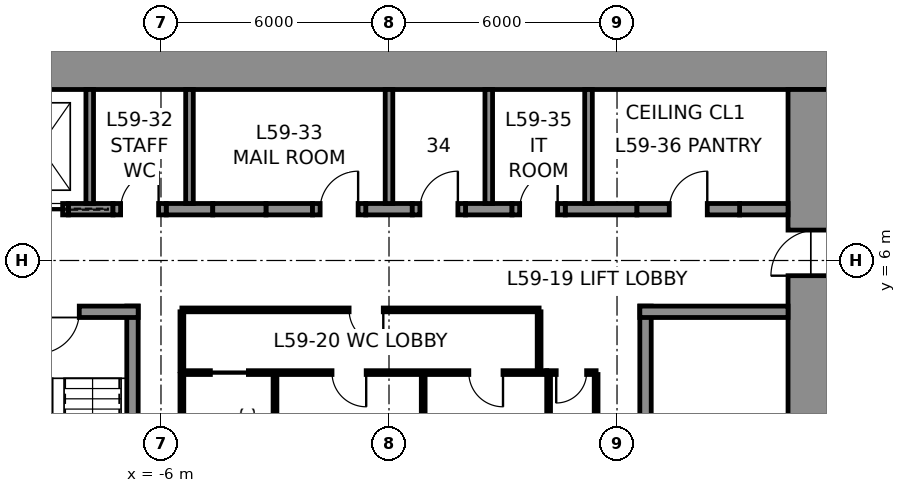
"""IFC4 building model, lengths in metres.
Left out: names, types, materials, properties, quantities, classifications, styles, units other than length and angle.
Written with IfcOpenShell. Run it as: python <this file> out.ifc"""

import sys

from ifc_helpers import new_model, si_unit, direction, frame, frame_2d, origin, place, context, subcontext, project, spatial, rectangle, extrude, element, fill, save


model = new_model("IFC4")
c1 = context("Model", 3, precision=1e-05, world=origin(), true_north=direction((0.0, 1.0)))
c2 = subcontext(c1, "Body", "Model", "MODEL_VIEW")
j1 = project(units=[si_unit("LENGTHUNIT", "METRE"), si_unit("PLANEANGLEUNIT", "RADIAN")], contexts=[c1])
p1 = place(None, origin())
s1 = spatial("IfcSite", under=j1, at=p1, CompositionType="ELEMENT")
p2 = place(p1, origin())
s2 = spatial("IfcBuilding", under=s1, at=p2, CompositionType="ELEMENT")
p3 = place(p2, frame((0.0, 0.0, 265.8)))
s3 = spatial("IfcBuildingStorey", under=s2, at=p3, CompositionType="ELEMENT", Elevation=265.8)
p4 = place(p3, frame((-12.0, 11.25, 0.0), z_axis=(0.0, 0.0, 1.0), x_axis=(1.0, 0.0, 0.0)))
e1 = element("IfcWall", 1, at=p4, inside=s3, PredefinedType="SHEAR", context=c2, shape_type="SweptSolid", body=[
    extrude(rectangle(XDim=24.0, YDim=1.5, at=frame_2d((12.0, 0.0))), origin(), (0.0, 0.0, 1.0), 4.0),
])
p5 = place(p3, frame((11.25, 10.5, 0.0), z_axis=(0.0, 0.0, 1.0), x_axis=(0.0, -1.0, 0.0)))
e2 = element("IfcWall", 2, at=p5, inside=s3, PredefinedType="SHEAR", context=c2, shape_type="SweptSolid", body=[
    extrude(rectangle(XDim=21.0, YDim=1.5, at=frame_2d((10.5, 0.0))), origin(), (0.0, 0.0, 1.0), 4.0),
])
p6 = place(p5, frame((3.7, 0.0, 0.0)))
e3 = element("IfcOpeningElement", 3, at=p6, cuts=e2, PredefinedType="OPENING", context=c2, shape_type="SweptSolid", body=[
    extrude(rectangle(XDim=1.2, YDim=2.3, at=frame_2d((0.6, 1.15))), frame((0.0, 0.76, 0.0), z_axis=(0.0, -1.0, 0.0), x_axis=(1.0, 0.0, 0.0)), (0.0, 0.0, 1.0), 1.52),
])
p7 = place(p5, frame((16.1, 0.0, 0.0)))
e4 = element("IfcOpeningElement", 4, at=p7, cuts=e2, PredefinedType="OPENING", context=c2, shape_type="SweptSolid", body=[
    extrude(rectangle(XDim=1.2, YDim=2.3, at=frame_2d((0.6, 1.15))), frame((0.0, 0.76, 0.0), z_axis=(0.0, -1.0, 0.0), x_axis=(1.0, 0.0, 0.0)), (0.0, 0.0, 1.0), 1.52),
])
p8 = place(p3, frame((-8.438, 7.35, 0.0), z_axis=(0.0, 0.0, 1.0), x_axis=(1.0, 0.0, 0.0)))
e5 = element("IfcWall", 5, at=p8, inside=s3, PredefinedType="SHEAR", context=c2, shape_type="SweptSolid", body=[
    extrude(rectangle(XDim=1.175, YDim=0.3, at=frame_2d((0.587, 0.0))), origin(), (0.0, 0.0, 1.0), 4.0),
])
for number, where, z_axis, x_axis in (
    (6, (-5.863, 7.35, 0.0), (0.0, 0.0, 1.0), (1.0, 0.0, 0.0)),
    (7, (-3.238, 7.35, 0.0), (0.0, 0.0, 1.0), (1.0, 0.0, 0.0)),
    (8, (-0.613, 7.35, 0.0), (0.0, 0.0, 1.0), (1.0, 0.0, 0.0)),
    (9, (2.012, 7.35, 0.0), (0.0, 0.0, 1.0), (1.0, 0.0, 0.0)),
):
    element("IfcWall", number, at=place(p3, frame(where, z_axis=z_axis, x_axis=x_axis)), inside=s3, PredefinedType="SHEAR", context=c2, shape_type="SweptSolid", body=[
        extrude(rectangle(XDim=1.225, YDim=0.3, at=frame_2d((0.613, 0.0))), origin(), (0.0, 0.0, 1.0), 4.0),
    ])
p9 = place(p3, frame((4.637, 7.35, 0.0), z_axis=(0.0, 0.0, 1.0), x_axis=(1.0, 0.0, 0.0)))
e10 = element("IfcWall", 10, at=p9, inside=s3, PredefinedType="SHEAR", context=c2, shape_type="SweptSolid", body=[
    extrude(rectangle(XDim=1.887, YDim=0.3, at=frame_2d((0.944, 0.0))), origin(), (0.0, 0.0, 1.0), 4.0),
])
p10 = place(p3, frame((9.225, 7.35, 0.0), z_axis=(0.0, 0.0, 1.0), x_axis=(1.0, 0.0, 0.0)))
e11 = element("IfcWall", 11, at=p10, inside=s3, PredefinedType="SHEAR", context=c2, shape_type="SweptSolid", body=[
    extrude(rectangle(XDim=1.275, YDim=0.3, at=frame_2d((0.637, 0.0))), origin(), (0.0, 0.0, 1.0), 4.0),
])
p11 = place(p3, frame((-9.938, 7.35, 0.0), z_axis=(0.0, 0.0, 1.0), x_axis=(1.0, 0.0, 0.0)))
e12 = element("IfcWall", 12, at=p11, inside=s3, PredefinedType="PARTITIONING", context=c2, shape_type="SweptSolid", body=[
    extrude(rectangle(XDim=1.5, YDim=0.3, at=frame_2d((0.75, 0.0))), origin(), (0.0, 0.0, 1.0), 4.0),
])
p12 = place(p11, frame((0.15, 0.0, 0.0)))
e13 = element("IfcOpeningElement", 13, at=p12, cuts=e12, PredefinedType="OPENING", context=c2, shape_type="SweptSolid", body=[
    extrude(rectangle(XDim=1.2, YDim=2.3, at=frame_2d((0.6, 1.15))), frame((0.0, 0.16, 0.0), z_axis=(0.0, -1.0, 0.0), x_axis=(1.0, 0.0, 0.0)), (0.0, 0.0, 1.0), 0.32),
])
p13 = place(p3, frame((-7.262, 7.35, 0.0), z_axis=(0.0, 0.0, 1.0), x_axis=(1.0, 0.0, 0.0)))
e14 = element("IfcWall", 14, at=p13, inside=s3, PredefinedType="PARTITIONING", context=c2, shape_type="SweptSolid", body=[
    extrude(rectangle(XDim=1.4, YDim=0.3, at=frame_2d((0.7, 0.0))), origin(), (0.0, 0.0, 1.0), 4.0),
])
p14 = place(p13, frame((0.2, 0.0, 0.0)))
e15 = element("IfcOpeningElement", 15, at=p14, cuts=e14, PredefinedType="OPENING", context=c2, shape_type="SweptSolid", body=[
    extrude(rectangle(XDim=1.0, YDim=2.3, at=frame_2d((0.5, 1.15))), frame((0.0, 0.16, 0.0), z_axis=(0.0, -1.0, 0.0), x_axis=(1.0, 0.0, 0.0)), (0.0, 0.0, 1.0), 0.32),
])
p15 = place(p3, frame((-4.637, 7.35, 0.0), z_axis=(0.0, 0.0, 1.0), x_axis=(1.0, 0.0, 0.0)))
e16 = element("IfcWall", 16, at=p15, inside=s3, PredefinedType="PARTITIONING", context=c2, shape_type="SweptSolid", body=[
    extrude(rectangle(XDim=1.4, YDim=0.3, at=frame_2d((0.7, 0.0))), origin(), (0.0, 0.0, 1.0), 4.0),
])
p16 = place(p3, frame((-2.012, 7.35, 0.0), z_axis=(0.0, 0.0, 1.0), x_axis=(1.0, 0.0, 0.0)))
e17 = element("IfcWall", 17, at=p16, inside=s3, PredefinedType="PARTITIONING", context=c2, shape_type="SweptSolid", body=[
    extrude(rectangle(XDim=1.4, YDim=0.3, at=frame_2d((0.7, 0.0))), origin(), (0.0, 0.0, 1.0), 4.0),
])
p17 = place(p16, frame((0.2, 0.0, 0.0)))
e18 = element("IfcOpeningElement", 18, at=p17, cuts=e17, PredefinedType="OPENING", context=c2, shape_type="SweptSolid", body=[
    extrude(rectangle(XDim=1.0, YDim=2.3, at=frame_2d((0.5, 1.15))), frame((0.0, 0.16, 0.0), z_axis=(0.0, -1.0, 0.0), x_axis=(1.0, 0.0, 0.0)), (0.0, 0.0, 1.0), 0.32),
])
p18 = place(p3, frame((0.613, 7.35, 0.0), z_axis=(0.0, 0.0, 1.0), x_axis=(1.0, 0.0, 0.0)))
e19 = element("IfcWall", 19, at=p18, inside=s3, PredefinedType="PARTITIONING", context=c2, shape_type="SweptSolid", body=[
    extrude(rectangle(XDim=1.4, YDim=0.3, at=frame_2d((0.7, 0.0))), origin(), (0.0, 0.0, 1.0), 4.0),
])
p19 = place(p18, frame((0.2, 0.0, 0.0)))
e20 = element("IfcOpeningElement", 20, at=p19, cuts=e19, PredefinedType="OPENING", context=c2, shape_type="SweptSolid", body=[
    extrude(rectangle(XDim=1.0, YDim=2.3, at=frame_2d((0.5, 1.15))), frame((0.0, 0.16, 0.0), z_axis=(0.0, -1.0, 0.0), x_axis=(1.0, 0.0, 0.0)), (0.0, 0.0, 1.0), 0.32),
])
p20 = place(p3, frame((3.238, 7.35, 0.0), z_axis=(0.0, 0.0, 1.0), x_axis=(1.0, 0.0, 0.0)))
e21 = element("IfcWall", 21, at=p20, inside=s3, PredefinedType="PARTITIONING", context=c2, shape_type="SweptSolid", body=[
    extrude(rectangle(XDim=1.4, YDim=0.3, at=frame_2d((0.7, 0.0))), origin(), (0.0, 0.0, 1.0), 4.0),
])
p21 = place(p20, frame((0.2, 0.0, 0.0)))
e22 = element("IfcOpeningElement", 22, at=p21, cuts=e21, PredefinedType="OPENING", context=c2, shape_type="SweptSolid", body=[
    extrude(rectangle(XDim=1.0, YDim=2.3, at=frame_2d((0.5, 1.15))), frame((0.0, 0.16, 0.0), z_axis=(0.0, -1.0, 0.0), x_axis=(1.0, 0.0, 0.0)), (0.0, 0.0, 1.0), 0.32),
])
p22 = place(p3, frame((6.525, 7.35, 0.0), z_axis=(0.0, 0.0, 1.0), x_axis=(1.0, 0.0, 0.0)))
e23 = element("IfcWall", 23, at=p22, inside=s3, PredefinedType="PARTITIONING", context=c2, shape_type="SweptSolid", body=[
    extrude(rectangle(XDim=2.7, YDim=0.3, at=frame_2d((1.35, 0.0))), origin(), (0.0, 0.0, 1.0), 4.0),
])
p23 = place(p22, frame((0.85, 0.0, 0.0)))
e24 = element("IfcOpeningElement", 24, at=p23, cuts=e23, PredefinedType="OPENING", context=c2, shape_type="SweptSolid", body=[
    extrude(rectangle(XDim=1.0, YDim=2.3, at=frame_2d((0.5, 1.15))), frame((0.0, 0.16, 0.0), z_axis=(0.0, -1.0, 0.0), x_axis=(1.0, 0.0, 0.0)), (0.0, 0.0, 1.0), 0.32),
])
for number, where, z_axis, x_axis in (
    (25, (-7.875, 7.5, 0.0), (0.0, 0.0, 1.0), (0.0, 1.0, 0.0)),
    (26, (-5.25, 7.5, 0.0), (0.0, 0.0, 1.0), (0.0, 1.0, 0.0)),
    (27, (0.0, 7.5, 0.0), (0.0, 0.0, 1.0), (0.0, 1.0, 0.0)),
    (28, (2.625, 7.5, 0.0), (0.0, 0.0, 1.0), (0.0, 1.0, 0.0)),
    (29, (5.25, 7.5, 0.0), (0.0, 0.0, 1.0), (0.0, 1.0, 0.0)),
):
    element("IfcWall", number, at=place(p3, frame(where, z_axis=z_axis, x_axis=x_axis)), inside=s3, PredefinedType="PARTITIONING", context=c2, shape_type="SweptSolid", body=[
        extrude(rectangle(XDim=3.0, YDim=0.2, at=frame_2d((1.5, 0.0))), origin(), (0.0, 0.0, 1.0), 4.0),
    ])
p24 = place(p3, frame((-6.75, -4.8, 0.0), z_axis=(0.0, 0.0, 1.0), x_axis=(0.0, 1.0, 0.0)))
e30 = element("IfcWall", 30, at=p24, inside=s3, PredefinedType="SOLIDWALL", context=c2, shape_type="SweptSolid", body=[
    extrude(rectangle(XDim=9.6, YDim=0.3, at=frame_2d((4.8, 0.0))), origin(), (0.0, 0.0, 1.0), 3.75),
])
p25 = place(p3, frame((-10.5, 4.65, 0.0), z_axis=(0.0, 0.0, 1.0), x_axis=(1.0, 0.0, 0.0)))
e31 = element("IfcWall", 31, at=p25, inside=s3, PredefinedType="SOLIDWALL", context=c2, shape_type="SweptSolid", body=[
    extrude(rectangle(XDim=3.9, YDim=0.3, at=frame_2d((1.95, 0.0))), origin(), (0.0, 0.0, 1.0), 3.75),
])
p26 = place(p25, frame((1.25, 0.0, 0.0)))
e32 = element("IfcOpeningElement", 32, at=p26, cuts=e31, PredefinedType="OPENING", context=c2, shape_type="SweptSolid", body=[
    extrude(rectangle(XDim=1.1, YDim=2.3, at=frame_2d((0.55, 1.15))), frame((0.0, 0.16, 0.0), z_axis=(0.0, -1.0, 0.0), x_axis=(1.0, 0.0, 0.0)), (0.0, 0.0, 1.0), 0.32),
])
p27 = place(p3, frame((6.75, -4.8, 0.0), z_axis=(0.0, 0.0, 1.0), x_axis=(0.0, 1.0, 0.0)))
e33 = element("IfcWall", 33, at=p27, inside=s3, PredefinedType="SOLIDWALL", context=c2, shape_type="SweptSolid", body=[
    extrude(rectangle(XDim=9.6, YDim=0.3, at=frame_2d((4.8, 0.0))), origin(), (0.0, 0.0, 1.0), 3.75),
])
p28 = place(p3, frame((6.6, 4.65, 0.0), z_axis=(0.0, 0.0, 1.0), x_axis=(1.0, 0.0, 0.0)))
e34 = element("IfcWall", 34, at=p28, inside=s3, PredefinedType="SOLIDWALL", context=c2, shape_type="SweptSolid", body=[
    extrude(rectangle(XDim=3.9, YDim=0.3, at=frame_2d((1.95, 0.0))), origin(), (0.0, 0.0, 1.0), 3.75),
])
p29 = place(p3, frame((-5.45, 3.05, 0.0), z_axis=(0.0, 0.0, 1.0), x_axis=(1.0, 0.0, 0.0)))
e35 = element("IfcWall", 35, at=p29, inside=s3, PredefinedType="PARTITIONING", context=c2, shape_type="SweptSolid", body=[
    extrude(rectangle(XDim=9.6, YDim=0.1, at=frame_2d((4.8, 0.0))), origin(), (0.0, 0.0, 1.0), 3.75),
])
p30 = place(p29, frame((0.75, 0.0, 0.0)))
e36 = element("IfcOpeningElement", 36, at=p30, cuts=e35, PredefinedType="OPENING", context=c2, shape_type="SweptSolid", body=[
    extrude(rectangle(XDim=1.0, YDim=2.3, at=frame_2d((0.5, 1.15))), frame((0.0, 0.06, 0.0), z_axis=(0.0, -1.0, 0.0), x_axis=(1.0, 0.0, 0.0)), (0.0, 0.0, 1.0), 0.12),
])
p31 = place(p29, frame((3.95, 0.0, 0.0)))
e37 = element("IfcOpeningElement", 37, at=p31, cuts=e35, PredefinedType="OPENING", context=c2, shape_type="SweptSolid", body=[
    extrude(rectangle(XDim=0.9, YDim=2.3, at=frame_2d((0.45, 1.15))), frame((0.0, 0.06, 0.0), z_axis=(0.0, -1.0, 0.0), x_axis=(1.0, 0.0, 0.0)), (0.0, 0.0, 1.0), 0.12),
])
p32 = place(p29, frame((7.55, 0.0, 0.0)))
e38 = element("IfcOpeningElement", 38, at=p32, cuts=e35, PredefinedType="OPENING", context=c2, shape_type="SweptSolid", body=[
    extrude(rectangle(XDim=0.9, YDim=2.3, at=frame_2d((0.45, 1.15))), frame((0.0, 0.06, 0.0), z_axis=(0.0, -1.0, 0.0), x_axis=(1.0, 0.0, 0.0)), (0.0, 0.0, 1.0), 0.12),
])
p33 = place(p3, frame((4.15, 3.05, 0.0), z_axis=(0.0, 0.0, 1.0), x_axis=(1.0, 0.0, 0.0)))
e39 = element("IfcWall", 39, at=p33, inside=s3, PredefinedType="PARTITIONING", context=c2, shape_type="SweptSolid", body=[
    extrude(rectangle(XDim=1.3, YDim=0.1, at=frame_2d((0.65, 0.0))), origin(), (0.0, 0.0, 1.0), 3.75),
])
p34 = place(p33, frame((0.25, 0.0, 0.0)))
e40 = element("IfcOpeningElement", 40, at=p34, cuts=e39, PredefinedType="OPENING", context=c2, shape_type="SweptSolid", body=[
    extrude(rectangle(XDim=0.8, YDim=2.3, at=frame_2d((0.4, 1.15))), frame((0.0, 0.06, 0.0), z_axis=(0.0, -1.0, 0.0), x_axis=(1.0, 0.0, 0.0)), (0.0, 0.0, 1.0), 0.12),
])
for number, where, z_axis, x_axis in (
    (41, (5.45, 3.0, 0.0), (0.0, 0.0, 1.0), (0.0, -1.0, 0.0)),
    (42, (-5.45, -3.0, 0.0), (0.0, 0.0, 1.0), (0.0, 1.0, 0.0)),
    (43, (-3.0, -3.0, 0.0), (0.0, 0.0, 1.0), (0.0, 1.0, 0.0)),
    (44, (0.9, -3.0, 0.0), (0.0, 0.0, 1.0), (0.0, 1.0, 0.0)),
    (45, (4.2, -3.0, 0.0), (0.0, 0.0, 1.0), (0.0, 1.0, 0.0)),
):
    element("IfcWall", number, at=place(p3, frame(where, z_axis=z_axis, x_axis=x_axis)), inside=s3, PredefinedType="PARTITIONING", context=c2, shape_type="SweptSolid", body=[
        extrude(rectangle(XDim=6.0, YDim=0.1, at=frame_2d((3.0, 0.0))), origin(), (0.0, 0.0, 1.0), 3.75),
    ])
p35 = place(p3, frame((-5.45, 4.7, 0.0), z_axis=(0.0, 0.0, 1.0), x_axis=(1.0, 0.0, 0.0)))
e46 = element("IfcWall", 46, at=p35, inside=s3, PredefinedType="PARTITIONING", context=c2, shape_type="SweptSolid", body=[
    extrude(rectangle(XDim=9.4, YDim=0.1, at=frame_2d((4.7, 0.0))), origin(), (0.0, 0.0, 1.0), 3.75),
])
p36 = place(p35, frame((4.4, 0.0, 0.0)))
e47 = element("IfcOpeningElement", 47, at=p36, cuts=e46, PredefinedType="OPENING", context=c2, shape_type="SweptSolid", body=[
    extrude(rectangle(XDim=0.9, YDim=2.3, at=frame_2d((0.45, 1.15))), frame((0.0, 0.06, 0.0), z_axis=(0.0, -1.0, 0.0), x_axis=(1.0, 0.0, 0.0)), (0.0, 0.0, 1.0), 0.12),
])
for number, where, z_axis, x_axis in (
    (48, (-5.45, 3.1, 0.0), (0.0, 0.0, 1.0), (0.0, 1.0, 0.0)),
    (49, (3.95, 3.1, 0.0), (0.0, 0.0, 1.0), (0.0, 1.0, 0.0)),
):
    element("IfcWall", number, at=place(p3, frame(where, z_axis=z_axis, x_axis=x_axis)), inside=s3, PredefinedType="PARTITIONING", context=c2, shape_type="SweptSolid", body=[
        extrude(rectangle(XDim=1.55, YDim=0.1, at=frame_2d((0.775, 0.0))), origin(), (0.0, 0.0, 1.0), 3.75),
    ])
p37 = place(p26, frame((1.1, 0.0, 0.0), z_axis=(0.0, 0.0, 1.0), x_axis=(-1.0, 0.0, 0.0)))
e50 = element("IfcDoor", 50, at=p37, inside=s3, OperationType="SINGLE_SWING_RIGHT", PredefinedType="DOOR", context=c2, shape_type="SweptSolid", body=[
    extrude(rectangle(XDim=1.1, YDim=2.3, at=frame_2d((0.55, 1.15))), frame((0.0, 0.025, 0.0), z_axis=(0.0, -1.0, 0.0), x_axis=(1.0, 0.0, 0.0)), (0.0, 0.0, 1.0), 0.05),
])
fill(e32, e50)
p38 = place(p30, frame((1.0, 0.0, 0.0), z_axis=(0.0, 0.0, 1.0), x_axis=(-1.0, 0.0, 0.0)))
e51 = element("IfcDoor", 51, at=p38, inside=s3, OperationType="SLIDING_TO_LEFT", PredefinedType="DOOR", context=c2, shape_type="SweptSolid", body=[
    extrude(rectangle(XDim=1.0, YDim=2.3, at=frame_2d((0.5, 1.15))), frame((0.0, 0.025, 0.0), z_axis=(0.0, -1.0, 0.0), x_axis=(1.0, 0.0, 0.0)), (0.0, 0.0, 1.0), 0.05),
])
fill(e36, e51)
p39 = place(p31, frame((0.9, 0.0, 0.0), z_axis=(0.0, 0.0, 1.0), x_axis=(-1.0, 0.0, 0.0)))
e52 = element("IfcDoor", 52, at=p39, inside=s3, OperationType="SINGLE_SWING_LEFT", PredefinedType="DOOR", context=c2, shape_type="SweptSolid", body=[
    extrude(rectangle(XDim=0.9, YDim=2.3, at=frame_2d((0.45, 1.15))), frame((0.0, 0.025, 0.0), z_axis=(0.0, -1.0, 0.0), x_axis=(1.0, 0.0, 0.0)), (0.0, 0.0, 1.0), 0.05),
])
fill(e37, e52)
p40 = place(p32, frame((0.9, 0.0, 0.0), z_axis=(0.0, 0.0, 1.0), x_axis=(-1.0, 0.0, 0.0)))
e53 = element("IfcDoor", 53, at=p40, inside=s3, OperationType="SINGLE_SWING_LEFT", PredefinedType="DOOR", context=c2, shape_type="SweptSolid", body=[
    extrude(rectangle(XDim=0.9, YDim=2.3, at=frame_2d((0.45, 1.15))), frame((0.0, 0.025, 0.0), z_axis=(0.0, -1.0, 0.0), x_axis=(1.0, 0.0, 0.0)), (0.0, 0.0, 1.0), 0.05),
])
fill(e38, e53)
p41 = place(p34, frame((0.8, 0.0, 0.0), z_axis=(0.0, 0.0, 1.0), x_axis=(-1.0, 0.0, 0.0)))
e54 = element("IfcDoor", 54, at=p41, inside=s3, OperationType="SINGLE_SWING_RIGHT", PredefinedType="DOOR", context=c2, shape_type="SweptSolid", body=[
    extrude(rectangle(XDim=0.8, YDim=2.3, at=frame_2d((0.4, 1.15))), frame((0.0, 0.025, 0.0), z_axis=(0.0, -1.0, 0.0), x_axis=(1.0, 0.0, 0.0)), (0.0, 0.0, 1.0), 0.05),
])
fill(e40, e54)
p42 = place(p36, frame((0.9, 0.0, 0.0), z_axis=(0.0, 0.0, 1.0), x_axis=(-1.0, 0.0, 0.0)))
e55 = element("IfcDoor", 55, at=p42, inside=s3, OperationType="SINGLE_SWING_LEFT", PredefinedType="DOOR", context=c2, shape_type="SweptSolid", body=[
    extrude(rectangle(XDim=0.9, YDim=2.3, at=frame_2d((0.45, 1.15))), frame((0.0, 0.025, 0.0), z_axis=(0.0, -1.0, 0.0), x_axis=(1.0, 0.0, 0.0)), (0.0, 0.0, 1.0), 0.05),
])
fill(e47, e55)
p43 = place(p14, origin())
e56 = element("IfcDoor", 56, at=p43, inside=s3, OperationType="SINGLE_SWING_RIGHT", PredefinedType="DOOR", context=c2, shape_type="SweptSolid", body=[
    extrude(rectangle(XDim=1.0, YDim=2.3, at=frame_2d((0.5, 1.15))), frame((0.0, 0.025, 0.0), z_axis=(0.0, -1.0, 0.0), x_axis=(1.0, 0.0, 0.0)), (0.0, 0.0, 1.0), 0.05),
])
fill(e15, e56)
p44 = place(p17, origin())
e57 = element("IfcDoor", 57, at=p44, inside=s3, OperationType="SINGLE_SWING_RIGHT", PredefinedType="DOOR", context=c2, shape_type="SweptSolid", body=[
    extrude(rectangle(XDim=1.0, YDim=2.3, at=frame_2d((0.5, 1.15))), frame((0.0, 0.025, 0.0), z_axis=(0.0, -1.0, 0.0), x_axis=(1.0, 0.0, 0.0)), (0.0, 0.0, 1.0), 0.05),
])
fill(e18, e57)
p45 = place(p19, origin())
e58 = element("IfcDoor", 58, at=p45, inside=s3, OperationType="SINGLE_SWING_RIGHT", PredefinedType="DOOR", context=c2, shape_type="SweptSolid", body=[
    extrude(rectangle(XDim=1.0, YDim=2.3, at=frame_2d((0.5, 1.15))), frame((0.0, 0.025, 0.0), z_axis=(0.0, -1.0, 0.0), x_axis=(1.0, 0.0, 0.0)), (0.0, 0.0, 1.0), 0.05),
])
fill(e20, e58)
p46 = place(p21, origin())
e59 = element("IfcDoor", 59, at=p46, inside=s3, OperationType="SINGLE_SWING_RIGHT", PredefinedType="DOOR", context=c2, shape_type="SweptSolid", body=[
    extrude(rectangle(XDim=1.0, YDim=2.3, at=frame_2d((0.5, 1.15))), frame((0.0, 0.025, 0.0), z_axis=(0.0, -1.0, 0.0), x_axis=(1.0, 0.0, 0.0)), (0.0, 0.0, 1.0), 0.05),
])
fill(e22, e59)
p47 = place(p23, origin())
e60 = element("IfcDoor", 60, at=p47, inside=s3, OperationType="SINGLE_SWING_RIGHT", PredefinedType="DOOR", context=c2, shape_type="SweptSolid", body=[
    extrude(rectangle(XDim=1.0, YDim=2.3, at=frame_2d((0.5, 1.15))), frame((0.0, 0.025, 0.0), z_axis=(0.0, -1.0, 0.0), x_axis=(1.0, 0.0, 0.0)), (0.0, 0.0, 1.0), 0.05),
])
fill(e24, e60)
p48 = place(p6, frame((1.2, 0.0, 0.0), z_axis=(0.0, 0.0, 1.0), x_axis=(-1.0, 0.0, 0.0)))
e61 = element("IfcDoor", 61, at=p48, inside=s3, OperationType="SINGLE_SWING_LEFT", PredefinedType="DOOR", context=c2, shape_type="SweptSolid", body=[
    extrude(rectangle(XDim=1.2, YDim=2.3, at=frame_2d((0.6, 1.15))), frame((0.0, 0.025, 0.0), z_axis=(0.0, -1.0, 0.0), x_axis=(1.0, 0.0, 0.0)), (0.0, 0.0, 1.0), 0.05),
])
fill(e3, e61)
p49 = place(p12, frame((1.2, 0.0, 0.0), z_axis=(0.0, 0.0, 1.0), x_axis=(-1.0, 0.0, 0.0)))
e62 = element("IfcDoor", 62, at=p49, inside=s3, OperationType="SLIDING_TO_LEFT", PredefinedType="DOOR", context=c2, shape_type="SweptSolid", body=[
    extrude(rectangle(XDim=1.2, YDim=2.3, at=frame_2d((0.6, 1.15))), frame((0.0, 0.025, 0.0), z_axis=(0.0, -1.0, 0.0), x_axis=(1.0, 0.0, 0.0)), (0.0, 0.0, 1.0), 0.05),
])
fill(e13, e62)
save(model, sys.argv[1])
